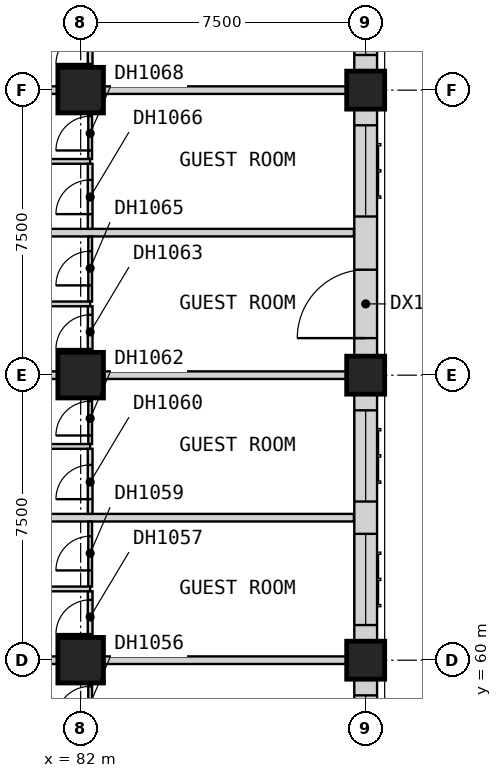
"""IFC4 building model, lengths in metres.
Left out: names, types, materials, properties, quantities, classifications, styles, units other than length and angle.
Written with IfcOpenShell. Run it as: python <this file> out.ifc"""

import sys

from ifc_helpers import new_model, si_unit, direction, frame, frame_2d, origin, origin_2d, place, context, subcontext, project, spatial, rectangle, extrude, element, fill, save


model = new_model("IFC4")
c1 = context("Model", 3, precision=1e-05, world=origin(), true_north=direction((0.0, 1.0)))
c2 = subcontext(c1, "Body", "Model", "MODEL_VIEW")
j1 = project(units=[si_unit("LENGTHUNIT", "METRE"), si_unit("PLANEANGLEUNIT", "RADIAN")], contexts=[c1])
p1 = place(None, origin())
s1 = spatial("IfcSite", under=j1, at=p1, CompositionType="ELEMENT")
p2 = place(p1, origin())
s2 = spatial("IfcBuilding", under=s1, at=p2, CompositionType="ELEMENT")
p3 = place(p2, frame((0.0, 0.0, 34.0)))
s3 = spatial("IfcBuildingStorey", under=s2, at=p3, CompositionType="ELEMENT", Elevation=34.0)
for number, where, z_axis, x_axis in (
    (1, (82.0, 60.0, 0.0), (0.0, 0.0, 1.0), (1.0, 0.0, 0.0)),
    (2, (82.0, 67.5, 0.0), (0.0, 0.0, 1.0), (1.0, 0.0, 0.0)),
    (3, (82.0, 75.0, 0.0), (0.0, 0.0, 1.0), (1.0, 0.0, 0.0)),
):
    element("IfcColumn", number, at=place(p3, frame(where, z_axis=z_axis, x_axis=x_axis)), inside=s3, PredefinedType="COLUMN", context=c2, shape_type="SweptSolid", body=[
        extrude(rectangle(XDim=1.2, YDim=1.2, at=origin_2d()), origin(), (0.0, 0.0, 1.0), 3.6),
    ])
for number, where, z_axis, x_axis in (
    (4, (89.5, 60.0, 0.0), (0.0, 0.0, 1.0), (1.0, 0.0, 0.0)),
    (5, (89.5, 67.5, 0.0), (0.0, 0.0, 1.0), (1.0, 0.0, 0.0)),
    (6, (89.5, 75.0, 0.0), (0.0, 0.0, 1.0), (1.0, 0.0, 0.0)),
):
    element("IfcColumn", number, at=place(p3, frame(where, z_axis=z_axis, x_axis=x_axis)), inside=s3, PredefinedType="COLUMN", context=c2, shape_type="SweptSolid", body=[
        extrude(rectangle(XDim=1.0, YDim=1.0, at=origin_2d()), origin(), (0.0, 0.0, 1.0), 3.6),
    ])
p4 = place(p3, frame((89.5, 53.0, 0.0), z_axis=(0.0, 0.0, 1.0), x_axis=(0.0, 1.0, 0.0)))
e7 = element("IfcWall", 7, at=p4, inside=s3, PredefinedType="SOLIDWALL", context=c2, shape_type="SweptSolid", body=[
    extrude(rectangle(XDim=6.5, YDim=0.6, at=frame_2d((3.25, 0.0))), origin(), (0.0, 0.0, 1.0), 2.85),
])
p5 = place(p4, frame((0.425, 0.0, 0.8)))
e8 = element("IfcOpeningElement", 8, at=p5, cuts=e7, PredefinedType="OPENING", context=c2, shape_type="SweptSolid", body=[
    extrude(rectangle(XDim=2.4, YDim=1.8, at=frame_2d((1.2, 0.9))), frame((0.0, 0.31, 0.0), z_axis=(0.0, -1.0, 0.0), x_axis=(1.0, 0.0, 0.0)), (0.0, 0.0, 1.0), 0.62),
])
p6 = place(p4, frame((3.675, 0.0, 0.8)))
e9 = element("IfcOpeningElement", 9, at=p6, cuts=e7, PredefinedType="OPENING", context=c2, shape_type="SweptSolid", body=[
    extrude(rectangle(XDim=2.4, YDim=1.8, at=frame_2d((1.2, 0.9))), frame((0.0, 0.31, 0.0), z_axis=(0.0, -1.0, 0.0), x_axis=(1.0, 0.0, 0.0)), (0.0, 0.0, 1.0), 0.62),
])
p7 = place(p3, frame((89.5, 60.5, 0.0), z_axis=(0.0, 0.0, 1.0), x_axis=(0.0, 1.0, 0.0)))
e10 = element("IfcWall", 10, at=p7, inside=s3, PredefinedType="SOLIDWALL", context=c2, shape_type="SweptSolid", body=[
    extrude(rectangle(XDim=6.5, YDim=0.6, at=frame_2d((3.25, 0.0))), origin(), (0.0, 0.0, 1.0), 2.85),
])
p8 = place(p7, frame((0.425, 0.0, 0.8)))
e11 = element("IfcOpeningElement", 11, at=p8, cuts=e10, PredefinedType="OPENING", context=c2, shape_type="SweptSolid", body=[
    extrude(rectangle(XDim=2.4, YDim=1.8, at=frame_2d((1.2, 0.9))), frame((0.0, 0.31, 0.0), z_axis=(0.0, -1.0, 0.0), x_axis=(1.0, 0.0, 0.0)), (0.0, 0.0, 1.0), 0.62),
])
p9 = place(p7, frame((3.675, 0.0, 0.8)))
e12 = element("IfcOpeningElement", 12, at=p9, cuts=e10, PredefinedType="OPENING", context=c2, shape_type="SweptSolid", body=[
    extrude(rectangle(XDim=2.4, YDim=1.8, at=frame_2d((1.2, 0.9))), frame((0.0, 0.31, 0.0), z_axis=(0.0, -1.0, 0.0), x_axis=(1.0, 0.0, 0.0)), (0.0, 0.0, 1.0), 0.62),
])
p10 = place(p3, frame((89.5, 68.0, 0.0), z_axis=(0.0, 0.0, 1.0), x_axis=(0.0, 1.0, 0.0)))
e13 = element("IfcWall", 13, at=p10, inside=s3, PredefinedType="SOLIDWALL", context=c2, shape_type="SweptSolid", body=[
    extrude(rectangle(XDim=6.5, YDim=0.6, at=frame_2d((3.25, 0.0))), origin(), (0.0, 0.0, 1.0), 2.85),
])
p11 = place(p10, frame((0.475, 0.0, 0.0)))
e14 = element("IfcOpeningElement", 14, at=p11, cuts=e13, PredefinedType="OPENING", context=c2, shape_type="SweptSolid", body=[
    extrude(rectangle(XDim=1.8, YDim=2.4, at=frame_2d((0.9, 1.2))), frame((0.0, 0.31, 0.0), z_axis=(0.0, -1.0, 0.0), x_axis=(1.0, 0.0, 0.0)), (0.0, 0.0, 1.0), 0.62),
])
p12 = place(p10, frame((3.675, 0.0, 0.8)))
e15 = element("IfcOpeningElement", 15, at=p12, cuts=e13, PredefinedType="OPENING", context=c2, shape_type="SweptSolid", body=[
    extrude(rectangle(XDim=2.4, YDim=1.8, at=frame_2d((1.2, 0.9))), frame((0.0, 0.31, 0.0), z_axis=(0.0, -1.0, 0.0), x_axis=(1.0, 0.0, 0.0)), (0.0, 0.0, 1.0), 0.62),
])
p13 = place(p3, frame((89.5, 75.5, 0.0), z_axis=(0.0, 0.0, 1.0), x_axis=(0.0, 1.0, 0.0)))
e16 = element("IfcWall", 16, at=p13, inside=s3, PredefinedType="SOLIDWALL", context=c2, shape_type="SweptSolid", body=[
    extrude(rectangle(XDim=6.5, YDim=0.6, at=frame_2d((3.25, 0.0))), origin(), (0.0, 0.0, 1.0), 2.85),
])
p14 = place(p13, frame((0.425, 0.0, 0.8)))
e17 = element("IfcOpeningElement", 17, at=p14, cuts=e16, PredefinedType="OPENING", context=c2, shape_type="SweptSolid", body=[
    extrude(rectangle(XDim=2.4, YDim=1.8, at=frame_2d((1.2, 0.9))), frame((0.0, 0.31, 0.0), z_axis=(0.0, -1.0, 0.0), x_axis=(1.0, 0.0, 0.0)), (0.0, 0.0, 1.0), 0.62),
])
p15 = place(p13, frame((3.675, 0.0, 0.8)))
e18 = element("IfcOpeningElement", 18, at=p15, cuts=e16, PredefinedType="OPENING", context=c2, shape_type="SweptSolid", body=[
    extrude(rectangle(XDim=2.4, YDim=1.8, at=frame_2d((1.2, 0.9))), frame((0.0, 0.31, 0.0), z_axis=(0.0, -1.0, 0.0), x_axis=(1.0, 0.0, 0.0)), (0.0, 0.0, 1.0), 0.62),
])
p16 = place(p3, frame((77.475, 60.0, 0.0), z_axis=(0.0, 0.0, 1.0), x_axis=(1.0, 0.0, 0.0)))
e19 = element("IfcWall", 19, at=p16, inside=s3, PredefinedType="PARTITIONING", context=c2, shape_type="SweptSolid", body=[
    extrude(rectangle(XDim=12.525, YDim=0.2, at=frame_2d((6.262, 0.0))), origin(), (0.0, 0.0, 1.0), 3.35),
])
p17 = place(p3, frame((77.475, 63.75, 0.0), z_axis=(0.0, 0.0, 1.0), x_axis=(1.0, 0.0, 0.0)))
e20 = element("IfcWall", 20, at=p17, inside=s3, PredefinedType="PARTITIONING", context=c2, shape_type="SweptSolid", body=[
    extrude(rectangle(XDim=11.715, YDim=0.2, at=frame_2d((5.857, 0.0))), origin(), (0.0, 0.0, 1.0), 3.35),
])
p18 = place(p3, frame((77.475, 67.5, 0.0), z_axis=(0.0, 0.0, 1.0), x_axis=(1.0, 0.0, 0.0)))
e21 = element("IfcWall", 21, at=p18, inside=s3, PredefinedType="PARTITIONING", context=c2, shape_type="SweptSolid", body=[
    extrude(rectangle(XDim=12.525, YDim=0.2, at=frame_2d((6.262, 0.0))), origin(), (0.0, 0.0, 1.0), 3.35),
])
p19 = place(p3, frame((77.475, 71.25, 0.0), z_axis=(0.0, 0.0, 1.0), x_axis=(1.0, 0.0, 0.0)))
e22 = element("IfcWall", 22, at=p19, inside=s3, PredefinedType="PARTITIONING", context=c2, shape_type="SweptSolid", body=[
    extrude(rectangle(XDim=11.715, YDim=0.2, at=frame_2d((5.857, 0.0))), origin(), (0.0, 0.0, 1.0), 3.35),
])
p20 = place(p3, frame((77.475, 75.0, 0.0), z_axis=(0.0, 0.0, 1.0), x_axis=(1.0, 0.0, 0.0)))
e23 = element("IfcWall", 23, at=p20, inside=s3, PredefinedType="PARTITIONING", context=c2, shape_type="SweptSolid", body=[
    extrude(rectangle(XDim=12.525, YDim=0.2, at=frame_2d((6.262, 0.0))), origin(), (0.0, 0.0, 1.0), 3.35),
])
p21 = place(p3, frame((82.25, 58.188, 0.0), z_axis=(0.0, 0.0, 1.0), x_axis=(0.0, 1.0, 0.0)))
e24 = element("IfcWall", 24, at=p21, inside=s3, PredefinedType="PARTITIONING", context=c2, shape_type="SweptSolid", body=[
    extrude(rectangle(XDim=1.712, YDim=0.1, at=frame_2d((0.856, 0.0))), origin(), (0.0, 0.0, 1.0), 3.35),
])
p22 = place(p21, frame((0.225, 0.0, 0.0)))
e25 = element("IfcOpeningElement", 25, at=p22, cuts=e24, PredefinedType="OPENING", context=c2, shape_type="SweptSolid", body=[
    extrude(rectangle(XDim=0.9, YDim=2.1, at=frame_2d((0.45, 1.05))), frame((0.0, 0.06, 0.0), z_axis=(0.0, -1.0, 0.0), x_axis=(1.0, 0.0, 0.0)), (0.0, 0.0, 1.0), 0.12),
])
p23 = place(p3, frame((82.25, 61.938, 0.0), z_axis=(0.0, 0.0, 1.0), x_axis=(0.0, 1.0, 0.0)))
e26 = element("IfcWall", 26, at=p23, inside=s3, PredefinedType="PARTITIONING", context=c2, shape_type="SweptSolid", body=[
    extrude(rectangle(XDim=1.712, YDim=0.1, at=frame_2d((0.856, 0.0))), origin(), (0.0, 0.0, 1.0), 3.35),
])
p24 = place(p23, frame((0.425, 0.0, 0.0)))
e27 = element("IfcOpeningElement", 27, at=p24, cuts=e26, PredefinedType="OPENING", context=c2, shape_type="SweptSolid", body=[
    extrude(rectangle(XDim=0.9, YDim=2.1, at=frame_2d((0.45, 1.05))), frame((0.0, 0.06, 0.0), z_axis=(0.0, -1.0, 0.0), x_axis=(1.0, 0.0, 0.0)), (0.0, 0.0, 1.0), 0.12),
])
p25 = place(p3, frame((82.25, 65.688, 0.0), z_axis=(0.0, 0.0, 1.0), x_axis=(0.0, 1.0, 0.0)))
e28 = element("IfcWall", 28, at=p25, inside=s3, PredefinedType="PARTITIONING", context=c2, shape_type="SweptSolid", body=[
    extrude(rectangle(XDim=1.712, YDim=0.1, at=frame_2d((0.856, 0.0))), origin(), (0.0, 0.0, 1.0), 3.35),
])
p26 = place(p25, frame((0.225, 0.0, 0.0)))
e29 = element("IfcOpeningElement", 29, at=p26, cuts=e28, PredefinedType="OPENING", context=c2, shape_type="SweptSolid", body=[
    extrude(rectangle(XDim=0.9, YDim=2.1, at=frame_2d((0.45, 1.05))), frame((0.0, 0.06, 0.0), z_axis=(0.0, -1.0, 0.0), x_axis=(1.0, 0.0, 0.0)), (0.0, 0.0, 1.0), 0.12),
])
p27 = place(p3, frame((82.25, 69.438, 0.0), z_axis=(0.0, 0.0, 1.0), x_axis=(0.0, 1.0, 0.0)))
e30 = element("IfcWall", 30, at=p27, inside=s3, PredefinedType="PARTITIONING", context=c2, shape_type="SweptSolid", body=[
    extrude(rectangle(XDim=1.712, YDim=0.1, at=frame_2d((0.856, 0.0))), origin(), (0.0, 0.0, 1.0), 3.35),
])
p28 = place(p27, frame((0.425, 0.0, 0.0)))
e31 = element("IfcOpeningElement", 31, at=p28, cuts=e30, PredefinedType="OPENING", context=c2, shape_type="SweptSolid", body=[
    extrude(rectangle(XDim=0.9, YDim=2.1, at=frame_2d((0.45, 1.05))), frame((0.0, 0.06, 0.0), z_axis=(0.0, -1.0, 0.0), x_axis=(1.0, 0.0, 0.0)), (0.0, 0.0, 1.0), 0.12),
])
p29 = place(p3, frame((82.25, 73.188, 0.0), z_axis=(0.0, 0.0, 1.0), x_axis=(0.0, 1.0, 0.0)))
e32 = element("IfcWall", 32, at=p29, inside=s3, PredefinedType="PARTITIONING", context=c2, shape_type="SweptSolid", body=[
    extrude(rectangle(XDim=1.712, YDim=0.1, at=frame_2d((0.856, 0.0))), origin(), (0.0, 0.0, 1.0), 3.35),
])
p30 = place(p29, frame((0.225, 0.0, 0.0)))
e33 = element("IfcOpeningElement", 33, at=p30, cuts=e32, PredefinedType="OPENING", context=c2, shape_type="SweptSolid", body=[
    extrude(rectangle(XDim=0.9, YDim=2.1, at=frame_2d((0.45, 1.05))), frame((0.0, 0.06, 0.0), z_axis=(0.0, -1.0, 0.0), x_axis=(1.0, 0.0, 0.0)), (0.0, 0.0, 1.0), 0.12),
])
for number, where, z_axis, x_axis in (
    (34, (77.475, 61.875, 0.0), (0.0, 0.0, 1.0), (1.0, 0.0, 0.0)),
    (35, (77.475, 65.625, 0.0), (0.0, 0.0, 1.0), (1.0, 0.0, 0.0)),
    (36, (77.475, 69.375, 0.0), (0.0, 0.0, 1.0), (1.0, 0.0, 0.0)),
    (37, (77.475, 73.125, 0.0), (0.0, 0.0, 1.0), (1.0, 0.0, 0.0)),
):
    element("IfcWall", number, at=place(p3, frame(where, z_axis=z_axis, x_axis=x_axis)), inside=s3, PredefinedType="PARTITIONING", context=c2, shape_type="SweptSolid", body=[
        extrude(rectangle(XDim=4.775, YDim=0.125, at=frame_2d((2.387, 0.0))), origin(), (0.0, 0.0, 1.0), 3.35),
    ])
p31 = place(p3, frame((82.25, 60.1, 0.0), z_axis=(0.0, 0.0, 1.0), x_axis=(0.0, 1.0, 0.0)))
e38 = element("IfcWall", 38, at=p31, inside=s3, PredefinedType="PARTITIONING", context=c2, shape_type="SweptSolid", body=[
    extrude(rectangle(XDim=1.712, YDim=0.125, at=frame_2d((0.856, 0.0))), origin(), (0.0, 0.0, 1.0), 3.35),
])
p32 = place(p31, frame((0.587, 0.0, 0.0)))
e39 = element("IfcOpeningElement", 39, at=p32, cuts=e38, PredefinedType="OPENING", context=c2, shape_type="SweptSolid", body=[
    extrude(rectangle(XDim=0.9, YDim=2.1, at=frame_2d((0.45, 1.05))), frame((0.0, 0.073, 0.0), z_axis=(0.0, -1.0, 0.0), x_axis=(1.0, 0.0, 0.0)), (0.0, 0.0, 1.0), 0.145),
])
p33 = place(p3, frame((82.25, 63.85, 0.0), z_axis=(0.0, 0.0, 1.0), x_axis=(0.0, 1.0, 0.0)))
e40 = element("IfcWall", 40, at=p33, inside=s3, PredefinedType="PARTITIONING", context=c2, shape_type="SweptSolid", body=[
    extrude(rectangle(XDim=1.712, YDim=0.125, at=frame_2d((0.856, 0.0))), origin(), (0.0, 0.0, 1.0), 3.35),
])
p34 = place(p33, frame((0.387, 0.0, 0.0)))
e41 = element("IfcOpeningElement", 41, at=p34, cuts=e40, PredefinedType="OPENING", context=c2, shape_type="SweptSolid", body=[
    extrude(rectangle(XDim=0.9, YDim=2.1, at=frame_2d((0.45, 1.05))), frame((0.0, 0.073, 0.0), z_axis=(0.0, -1.0, 0.0), x_axis=(1.0, 0.0, 0.0)), (0.0, 0.0, 1.0), 0.145),
])
p35 = place(p3, frame((82.25, 67.6, 0.0), z_axis=(0.0, 0.0, 1.0), x_axis=(0.0, 1.0, 0.0)))
e42 = element("IfcWall", 42, at=p35, inside=s3, PredefinedType="PARTITIONING", context=c2, shape_type="SweptSolid", body=[
    extrude(rectangle(XDim=1.712, YDim=0.125, at=frame_2d((0.856, 0.0))), origin(), (0.0, 0.0, 1.0), 3.35),
])
p36 = place(p35, frame((0.587, 0.0, 0.0)))
e43 = element("IfcOpeningElement", 43, at=p36, cuts=e42, PredefinedType="OPENING", context=c2, shape_type="SweptSolid", body=[
    extrude(rectangle(XDim=0.9, YDim=2.1, at=frame_2d((0.45, 1.05))), frame((0.0, 0.073, 0.0), z_axis=(0.0, -1.0, 0.0), x_axis=(1.0, 0.0, 0.0)), (0.0, 0.0, 1.0), 0.145),
])
p37 = place(p3, frame((82.25, 71.35, 0.0), z_axis=(0.0, 0.0, 1.0), x_axis=(0.0, 1.0, 0.0)))
e44 = element("IfcWall", 44, at=p37, inside=s3, PredefinedType="PARTITIONING", context=c2, shape_type="SweptSolid", body=[
    extrude(rectangle(XDim=1.712, YDim=0.125, at=frame_2d((0.856, 0.0))), origin(), (0.0, 0.0, 1.0), 3.35),
])
p38 = place(p37, frame((0.387, 0.0, 0.0)))
e45 = element("IfcOpeningElement", 45, at=p38, cuts=e44, PredefinedType="OPENING", context=c2, shape_type="SweptSolid", body=[
    extrude(rectangle(XDim=0.9, YDim=2.1, at=frame_2d((0.45, 1.05))), frame((0.0, 0.073, 0.0), z_axis=(0.0, -1.0, 0.0), x_axis=(1.0, 0.0, 0.0)), (0.0, 0.0, 1.0), 0.145),
])
p39 = place(p3, frame((82.25, 75.1, 0.0), z_axis=(0.0, 0.0, 1.0), x_axis=(0.0, 1.0, 0.0)))
e46 = element("IfcWall", 46, at=p39, inside=s3, PredefinedType="PARTITIONING", context=c2, shape_type="SweptSolid", body=[
    extrude(rectangle(XDim=1.712, YDim=0.125, at=frame_2d((0.856, 0.0))), origin(), (0.0, 0.0, 1.0), 3.35),
])
p40 = place(p39, frame((0.587, 0.0, 0.0)))
e47 = element("IfcOpeningElement", 47, at=p40, cuts=e46, PredefinedType="OPENING", context=c2, shape_type="SweptSolid", body=[
    extrude(rectangle(XDim=0.9, YDim=2.1, at=frame_2d((0.45, 1.05))), frame((0.0, 0.073, 0.0), z_axis=(0.0, -1.0, 0.0), x_axis=(1.0, 0.0, 0.0)), (0.0, 0.0, 1.0), 0.145),
])
p41 = place(p6, origin())
e48 = element("IfcWindow", 48, at=p41, inside=s3, PartitioningType="SINGLE_PANEL", PredefinedType="WINDOW", context=c2, shape_type="SweptSolid", body=[
    extrude(rectangle(XDim=2.4, YDim=1.8, at=frame_2d((1.2, 0.9))), frame((0.0, -0.07, 0.0), z_axis=(0.0, -1.0, 0.0), x_axis=(1.0, 0.0, 0.0)), (0.0, 0.0, 1.0), 0.06),
])
fill(e9, e48)
p42 = place(p8, origin())
e49 = element("IfcWindow", 49, at=p42, inside=s3, PartitioningType="SINGLE_PANEL", PredefinedType="WINDOW", context=c2, shape_type="SweptSolid", body=[
    extrude(rectangle(XDim=2.4, YDim=1.8, at=frame_2d((1.2, 0.9))), frame((0.0, -0.07, 0.0), z_axis=(0.0, -1.0, 0.0), x_axis=(1.0, 0.0, 0.0)), (0.0, 0.0, 1.0), 0.06),
])
fill(e11, e49)
p43 = place(p9, origin())
e50 = element("IfcWindow", 50, at=p43, inside=s3, PartitioningType="SINGLE_PANEL", PredefinedType="WINDOW", context=c2, shape_type="SweptSolid", body=[
    extrude(rectangle(XDim=2.4, YDim=1.8, at=frame_2d((1.2, 0.9))), frame((0.0, -0.07, 0.0), z_axis=(0.0, -1.0, 0.0), x_axis=(1.0, 0.0, 0.0)), (0.0, 0.0, 1.0), 0.06),
])
fill(e12, e50)
p44 = place(p11, origin())
e51 = element("IfcDoor", 51, at=p44, inside=s3, OperationType="SINGLE_SWING_LEFT", PredefinedType="DOOR", context=c2, shape_type="SweptSolid", body=[
    extrude(rectangle(XDim=1.8, YDim=2.4, at=frame_2d((0.9, 1.2))), frame((0.0, -0.075, 0.0), z_axis=(0.0, -1.0, 0.0), x_axis=(1.0, 0.0, 0.0)), (0.0, 0.0, 1.0), 0.05),
])
fill(e14, e51)
p45 = place(p12, origin())
e52 = element("IfcWindow", 52, at=p45, inside=s3, PartitioningType="SINGLE_PANEL", PredefinedType="WINDOW", context=c2, shape_type="SweptSolid", body=[
    extrude(rectangle(XDim=2.4, YDim=1.8, at=frame_2d((1.2, 0.9))), frame((0.0, -0.07, 0.0), z_axis=(0.0, -1.0, 0.0), x_axis=(1.0, 0.0, 0.0)), (0.0, 0.0, 1.0), 0.06),
])
fill(e15, e52)
p46 = place(p14, origin())
e53 = element("IfcWindow", 53, at=p46, inside=s3, PartitioningType="SINGLE_PANEL", PredefinedType="WINDOW", context=c2, shape_type="SweptSolid", body=[
    extrude(rectangle(XDim=2.4, YDim=1.8, at=frame_2d((1.2, 0.9))), frame((0.0, -0.07, 0.0), z_axis=(0.0, -1.0, 0.0), x_axis=(1.0, 0.0, 0.0)), (0.0, 0.0, 1.0), 0.06),
])
fill(e17, e53)
p47 = place(p22, origin())
e54 = element("IfcDoor", 54, at=p47, inside=s3, OperationType="SINGLE_SWING_LEFT", PredefinedType="DOOR", context=c2, shape_type="SweptSolid", body=[
    extrude(rectangle(XDim=0.9, YDim=2.1, at=frame_2d((0.45, 1.05))), frame((0.0, 0.025, 0.0), z_axis=(0.0, -1.0, 0.0), x_axis=(1.0, 0.0, 0.0)), (0.0, 0.0, 1.0), 0.05),
])
fill(e25, e54)
p48 = place(p32, origin())
e55 = element("IfcDoor", 55, at=p48, inside=s3, OperationType="SINGLE_SWING_RIGHT", PredefinedType="DOOR", context=c2, shape_type="SweptSolid", body=[
    extrude(rectangle(XDim=0.9, YDim=2.1, at=frame_2d((0.45, 1.05))), frame((0.0, 0.025, 0.0), z_axis=(0.0, -1.0, 0.0), x_axis=(1.0, 0.0, 0.0)), (0.0, 0.0, 1.0), 0.05),
])
fill(e39, e55)
p49 = place(p24, origin())
e56 = element("IfcDoor", 56, at=p49, inside=s3, OperationType="SINGLE_SWING_LEFT", PredefinedType="DOOR", context=c2, shape_type="SweptSolid", body=[
    extrude(rectangle(XDim=0.9, YDim=2.1, at=frame_2d((0.45, 1.05))), frame((0.0, 0.025, 0.0), z_axis=(0.0, -1.0, 0.0), x_axis=(1.0, 0.0, 0.0)), (0.0, 0.0, 1.0), 0.05),
])
fill(e27, e56)
p50 = place(p34, origin())
e57 = element("IfcDoor", 57, at=p50, inside=s3, OperationType="SINGLE_SWING_LEFT", PredefinedType="DOOR", context=c2, shape_type="SweptSolid", body=[
    extrude(rectangle(XDim=0.9, YDim=2.1, at=frame_2d((0.45, 1.05))), frame((0.0, 0.025, 0.0), z_axis=(0.0, -1.0, 0.0), x_axis=(1.0, 0.0, 0.0)), (0.0, 0.0, 1.0), 0.05),
])
fill(e41, e57)
p51 = place(p26, origin())
e58 = element("IfcDoor", 58, at=p51, inside=s3, OperationType="SINGLE_SWING_LEFT", PredefinedType="DOOR", context=c2, shape_type="SweptSolid", body=[
    extrude(rectangle(XDim=0.9, YDim=2.1, at=frame_2d((0.45, 1.05))), frame((0.0, 0.025, 0.0), z_axis=(0.0, -1.0, 0.0), x_axis=(1.0, 0.0, 0.0)), (0.0, 0.0, 1.0), 0.05),
])
fill(e29, e58)
p52 = place(p36, origin())
e59 = element("IfcDoor", 59, at=p52, inside=s3, OperationType="SINGLE_SWING_RIGHT", PredefinedType="DOOR", context=c2, shape_type="SweptSolid", body=[
    extrude(rectangle(XDim=0.9, YDim=2.1, at=frame_2d((0.45, 1.05))), frame((0.0, 0.025, 0.0), z_axis=(0.0, -1.0, 0.0), x_axis=(1.0, 0.0, 0.0)), (0.0, 0.0, 1.0), 0.05),
])
fill(e43, e59)
p53 = place(p28, origin())
e60 = element("IfcDoor", 60, at=p53, inside=s3, OperationType="SINGLE_SWING_LEFT", PredefinedType="DOOR", context=c2, shape_type="SweptSolid", body=[
    extrude(rectangle(XDim=0.9, YDim=2.1, at=frame_2d((0.45, 1.05))), frame((0.0, 0.025, 0.0), z_axis=(0.0, -1.0, 0.0), x_axis=(1.0, 0.0, 0.0)), (0.0, 0.0, 1.0), 0.05),
])
fill(e31, e60)
p54 = place(p38, origin())
e61 = element("IfcDoor", 61, at=p54, inside=s3, OperationType="SINGLE_SWING_LEFT", PredefinedType="DOOR", context=c2, shape_type="SweptSolid", body=[
    extrude(rectangle(XDim=0.9, YDim=2.1, at=frame_2d((0.45, 1.05))), frame((0.0, 0.025, 0.0), z_axis=(0.0, -1.0, 0.0), x_axis=(1.0, 0.0, 0.0)), (0.0, 0.0, 1.0), 0.05),
])
fill(e45, e61)
p55 = place(p30, origin())
e62 = element("IfcDoor", 62, at=p55, inside=s3, OperationType="SINGLE_SWING_LEFT", PredefinedType="DOOR", context=c2, shape_type="SweptSolid", body=[
    extrude(rectangle(XDim=0.9, YDim=2.1, at=frame_2d((0.45, 1.05))), frame((0.0, 0.025, 0.0), z_axis=(0.0, -1.0, 0.0), x_axis=(1.0, 0.0, 0.0)), (0.0, 0.0, 1.0), 0.05),
])
fill(e33, e62)
p56 = place(p40, origin())
e63 = element("IfcDoor", 63, at=p56, inside=s3, OperationType="SINGLE_SWING_RIGHT", PredefinedType="DOOR", context=c2, shape_type="SweptSolid", body=[
    extrude(rectangle(XDim=0.9, YDim=2.1, at=frame_2d((0.45, 1.05))), frame((0.0, 0.025, 0.0), z_axis=(0.0, -1.0, 0.0), x_axis=(1.0, 0.0, 0.0)), (0.0, 0.0, 1.0), 0.05),
])
fill(e47, e63)
save(model, sys.argv[1])
